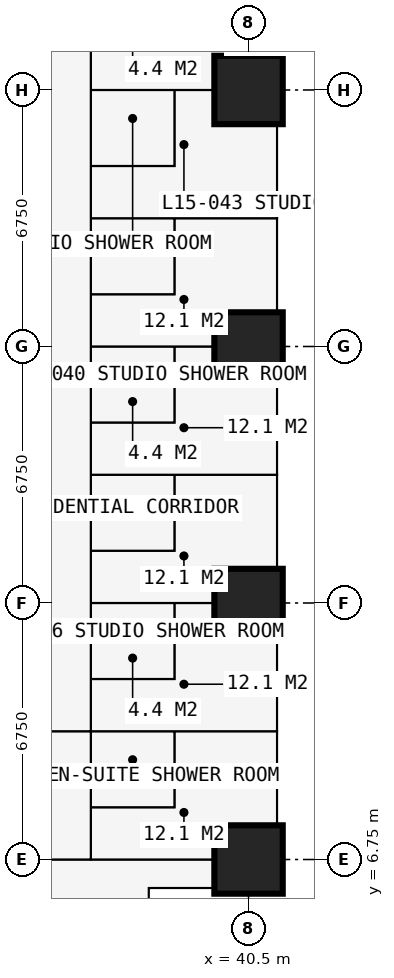
"""IFC4 building model, lengths in metres.
Left out: names, types, materials, properties, quantities, classifications, styles, units other than length and angle.
Written with IfcOpenShell. Run it as: python <this file> out.ifc"""

import sys

from ifc_helpers import new_model, si_unit, direction, frame, frame_2d, origin, origin_2d, place, context, subcontext, project, spatial, rectangle, extrude, element, fill, save


model = new_model("IFC4")
c1 = context("Model", 3, precision=1e-05, world=origin(), true_north=direction((0.0, 1.0)))
c2 = subcontext(c1, "Body", "Model", "MODEL_VIEW")
j1 = project(units=[si_unit("LENGTHUNIT", "METRE"), si_unit("PLANEANGLEUNIT", "RADIAN")], contexts=[c1])
p1 = place(None, origin())
s1 = spatial("IfcSite", under=j1, at=p1, CompositionType="ELEMENT")
p2 = place(p1, origin())
s2 = spatial("IfcBuilding", under=s1, at=p2, CompositionType="ELEMENT")
p3 = place(p2, frame((0.0, 0.0, 57.6)))
s3 = spatial("IfcBuildingStorey", under=s2, at=p3, CompositionType="ELEMENT", Elevation=57.6)
for number, where, z_axis, x_axis in (
    (1, (40.5, 6.75, 0.0), (0.0, 0.0, 1.0), (1.0, 0.0, 0.0)),
    (2, (40.5, 13.5, 0.0), (0.0, 0.0, 1.0), (1.0, 0.0, 0.0)),
    (3, (40.5, 20.25, 0.0), (0.0, 0.0, 1.0), (1.0, 0.0, 0.0)),
    (4, (40.5, 27.0, 0.0), (0.0, 0.0, 1.0), (1.0, 0.0, 0.0)),
):
    element("IfcColumn", number, at=place(p3, frame(where, z_axis=z_axis, x_axis=x_axis)), inside=s3, PredefinedType="COLUMN", context=c2, shape_type="SweptSolid", body=[
        extrude(rectangle(XDim=1.8, YDim=1.8, at=origin_2d()), origin(), (0.0, 0.0, 1.0), 3.6),
    ])
p4 = place(p3, frame((41.25, 27.0, 0.0), z_axis=(0.0, 0.0, 1.0), x_axis=(0.0, -1.0, 0.0)))
e5 = element("IfcWall", 5, at=p4, inside=s3, PredefinedType="SOLIDWALL", context=c2, shape_type="SweptSolid", body=[
    extrude(rectangle(XDim=6.75, YDim=0.15, at=frame_2d((3.375, 0.0))), origin(), (0.0, 0.0, 1.0), 3.375),
])
p5 = place(p4, frame((0.962, 0.0, 0.0)))
e6 = element("IfcOpeningElement", 6, at=p5, cuts=e5, PredefinedType="OPENING", context=c2, shape_type="SweptSolid", body=[
    extrude(rectangle(XDim=1.0, YDim=2.2, at=frame_2d((0.5, 1.1))), frame((0.0, 0.085, 0.0), z_axis=(0.0, -1.0, 0.0), x_axis=(1.0, 0.0, 0.0)), (0.0, 0.0, 1.0), 0.17),
])
p6 = place(p4, frame((2.025, 0.0, 0.9)))
e7 = element("IfcOpeningElement", 7, at=p6, cuts=e5, PredefinedType="OPENING", context=c2, shape_type="SweptSolid", body=[
    extrude(rectangle(XDim=1.2, YDim=1.8, at=frame_2d((0.6, 0.9))), frame((0.0, 0.085, 0.0), z_axis=(0.0, -1.0, 0.0), x_axis=(1.0, 0.0, 0.0)), (0.0, 0.0, 1.0), 0.17),
])
p7 = place(p4, frame((4.788, 0.0, 0.0)))
e8 = element("IfcOpeningElement", 8, at=p7, cuts=e5, PredefinedType="OPENING", context=c2, shape_type="SweptSolid", body=[
    extrude(rectangle(XDim=1.0, YDim=2.2, at=frame_2d((0.5, 1.1))), frame((0.0, 0.085, 0.0), z_axis=(0.0, -1.0, 0.0), x_axis=(1.0, 0.0, 0.0)), (0.0, 0.0, 1.0), 0.17),
])
p8 = place(p4, frame((3.525, 0.0, 0.9)))
e9 = element("IfcOpeningElement", 9, at=p8, cuts=e5, PredefinedType="OPENING", context=c2, shape_type="SweptSolid", body=[
    extrude(rectangle(XDim=1.2, YDim=1.8, at=frame_2d((0.6, 0.9))), frame((0.0, 0.085, 0.0), z_axis=(0.0, -1.0, 0.0), x_axis=(1.0, 0.0, 0.0)), (0.0, 0.0, 1.0), 0.17),
])
p9 = place(p3, frame((37.875, 2.625, 0.0), z_axis=(0.0, 0.0, 1.0), x_axis=(0.0, 1.0, 0.0)))
e10 = element("IfcWall", 10, at=p9, inside=s3, PredefinedType="SOLIDWALL", context=c2, shape_type="SweptSolid", body=[
    extrude(rectangle(XDim=3.375, YDim=0.3, at=frame_2d((1.688, 0.0))), origin(), (0.0, 0.0, 1.0), 3.375),
])
p10 = place(p9, frame((0.788, 0.0, 0.6)))
e11 = element("IfcOpeningElement", 11, at=p10, cuts=e10, PredefinedType="OPENING", context=c2, shape_type="SweptSolid", body=[
    extrude(rectangle(XDim=1.8, YDim=2.1, at=frame_2d((0.9, 1.05))), frame((0.0, 0.16, 0.0), z_axis=(0.0, -1.0, 0.0), x_axis=(1.0, 0.0, 0.0)), (0.0, 0.0, 1.0), 0.32),
])
p11 = place(p3, frame((37.875, 6.0, 0.0), z_axis=(0.0, 0.0, 1.0), x_axis=(1.0, 0.0, 0.0)))
e12 = element("IfcWall", 12, at=p11, inside=s3, PredefinedType="SOLIDWALL", context=c2, shape_type="SweptSolid", body=[
    extrude(rectangle(XDim=3.375, YDim=0.3, at=frame_2d((1.688, 0.0))), origin(), (0.0, 0.0, 1.0), 3.375),
])
p12 = place(p11, frame((0.343, 0.0, 0.9)))
e13 = element("IfcOpeningElement", 13, at=p12, cuts=e12, PredefinedType="OPENING", context=c2, shape_type="SweptSolid", body=[
    extrude(rectangle(XDim=1.2, YDim=1.8, at=frame_2d((0.6, 0.9))), frame((0.0, 0.16, 0.0), z_axis=(0.0, -1.0, 0.0), x_axis=(1.0, 0.0, 0.0)), (0.0, 0.0, 1.0), 0.32),
])
p13 = place(p3, frame((41.35, 23.625, 0.0), z_axis=(0.0, 0.0, 1.0), x_axis=(1.0, 0.0, 0.0)))
e14 = element("IfcWall", 14, at=p13, inside=s3, PredefinedType="USERDEFINED", context=c2, shape_type="SweptSolid", body=[
    extrude(rectangle(XDim=2.2, YDim=1.0, at=frame_2d((1.1, 0.0))), origin(), (0.0, 0.0, 1.0), 0.9),
])
p14 = place(p3, frame((30.375, 6.75, 0.0), z_axis=(0.0, 0.0, 1.0), x_axis=(1.0, 0.0, 0.0)))
e15 = element("IfcWall", 15, at=p14, inside=s3, PredefinedType="PARTITIONING", context=c2, shape_type="SweptSolid", body=[
    extrude(rectangle(XDim=10.859, YDim=0.15, at=frame_2d((5.429, 0.0))), origin(), (0.0, 0.0, 1.0), 2.877),
])
p15 = place(p14, frame((1.45, 0.0, 0.0)))
e16 = element("IfcOpeningElement", 16, at=p15, cuts=e15, PredefinedType="OPENING", context=c2, shape_type="SweptSolid", body=[
    extrude(rectangle(XDim=1.0, YDim=2.2, at=frame_2d((0.5, 1.1))), frame((0.0, 0.085, 0.0), z_axis=(0.0, -1.0, 0.0), x_axis=(1.0, 0.0, 0.0)), (0.0, 0.0, 1.0), 0.17),
])
p16 = place(p3, frame((30.375, 10.125, 0.0), z_axis=(0.0, 0.0, 1.0), x_axis=(1.0, 0.0, 0.0)))
e17 = element("IfcWall", 17, at=p16, inside=s3, PredefinedType="PARTITIONING", context=c2, shape_type="SweptSolid", body=[
    extrude(rectangle(XDim=10.859, YDim=0.15, at=frame_2d((5.429, 0.0))), origin(), (0.0, 0.0, 1.0), 3.375),
])
p17 = place(p16, frame((2.5, 0.0, 0.0)))
e18 = element("IfcOpeningElement", 18, at=p17, cuts=e17, PredefinedType="OPENING", context=c2, shape_type="SweptSolid", body=[
    extrude(rectangle(XDim=1.0, YDim=2.2, at=frame_2d((0.5, 1.1))), frame((0.0, 0.085, 0.0), z_axis=(0.0, -1.0, 0.0), x_axis=(1.0, 0.0, 0.0)), (0.0, 0.0, 1.0), 0.17),
])
p18 = place(p3, frame((36.35, 6.75, 0.0), z_axis=(0.0, 0.0, 1.0), x_axis=(0.0, 1.0, 0.0)))
e19 = element("IfcWall", 19, at=p18, inside=s3, PredefinedType="PARTITIONING", context=c2, shape_type="SweptSolid", body=[
    extrude(rectangle(XDim=23.625, YDim=0.1, at=frame_2d((11.812, 0.0))), origin(), (0.0, 0.0, 1.0), 3.375),
])
p19 = place(p18, frame((0.2, 0.0, 0.0)))
e20 = element("IfcOpeningElement", 20, at=p19, cuts=e19, PredefinedType="OPENING", context=c2, shape_type="SweptSolid", body=[
    extrude(rectangle(XDim=0.95, YDim=2.2, at=frame_2d((0.475, 1.1))), frame((0.0, 0.06, 0.0), z_axis=(0.0, -1.0, 0.0), x_axis=(1.0, 0.0, 0.0)), (0.0, 0.0, 1.0), 0.12),
])
p20 = place(p18, frame((3.575, 0.0, 0.0)))
e21 = element("IfcOpeningElement", 21, at=p20, cuts=e19, PredefinedType="OPENING", context=c2, shape_type="SweptSolid", body=[
    extrude(rectangle(XDim=0.95, YDim=2.2, at=frame_2d((0.475, 1.1))), frame((0.0, 0.06, 0.0), z_axis=(0.0, -1.0, 0.0), x_axis=(1.0, 0.0, 0.0)), (0.0, 0.0, 1.0), 0.12),
])
p21 = place(p18, frame((7.0, 0.0, 0.0)))
e22 = element("IfcOpeningElement", 22, at=p21, cuts=e19, PredefinedType="OPENING", context=c2, shape_type="SweptSolid", body=[
    extrude(rectangle(XDim=0.95, YDim=2.2, at=frame_2d((0.475, 1.1))), frame((0.0, 0.06, 0.0), z_axis=(0.0, -1.0, 0.0), x_axis=(1.0, 0.0, 0.0)), (0.0, 0.0, 1.0), 0.12),
])
p22 = place(p18, frame((10.375, 0.0, 0.0)))
e23 = element("IfcOpeningElement", 23, at=p22, cuts=e19, PredefinedType="OPENING", context=c2, shape_type="SweptSolid", body=[
    extrude(rectangle(XDim=0.95, YDim=2.2, at=frame_2d((0.475, 1.1))), frame((0.0, 0.06, 0.0), z_axis=(0.0, -1.0, 0.0), x_axis=(1.0, 0.0, 0.0)), (0.0, 0.0, 1.0), 0.12),
])
p23 = place(p18, frame((13.75, 0.0, 0.0)))
e24 = element("IfcOpeningElement", 24, at=p23, cuts=e19, PredefinedType="OPENING", context=c2, shape_type="SweptSolid", body=[
    extrude(rectangle(XDim=0.95, YDim=2.2, at=frame_2d((0.475, 1.1))), frame((0.0, 0.06, 0.0), z_axis=(0.0, -1.0, 0.0), x_axis=(1.0, 0.0, 0.0)), (0.0, 0.0, 1.0), 0.12),
])
p24 = place(p18, frame((17.125, 0.0, 0.0)))
e25 = element("IfcOpeningElement", 25, at=p24, cuts=e19, PredefinedType="OPENING", context=c2, shape_type="SweptSolid", body=[
    extrude(rectangle(XDim=0.95, YDim=2.2, at=frame_2d((0.475, 1.1))), frame((0.0, 0.06, 0.0), z_axis=(0.0, -1.0, 0.0), x_axis=(1.0, 0.0, 0.0)), (0.0, 0.0, 1.0), 0.12),
])
p25 = place(p18, frame((20.5, 0.0, 0.0)))
e26 = element("IfcOpeningElement", 26, at=p25, cuts=e19, PredefinedType="OPENING", context=c2, shape_type="SweptSolid", body=[
    extrude(rectangle(XDim=0.95, YDim=2.2, at=frame_2d((0.475, 1.1))), frame((0.0, 0.06, 0.0), z_axis=(0.0, -1.0, 0.0), x_axis=(1.0, 0.0, 0.0)), (0.0, 0.0, 1.0), 0.12),
])
p26 = place(p3, frame((36.35, 8.125, 0.0), z_axis=(0.0, 0.0, 1.0), x_axis=(1.0, 0.0, 0.0)))
e27 = element("IfcWall", 27, at=p26, inside=s3, PredefinedType="PARTITIONING", context=c2, shape_type="SweptSolid", body=[
    extrude(rectangle(XDim=2.2, YDim=0.1, at=frame_2d((1.1, 0.0))), origin(), (0.0, 0.0, 1.0), 3.375),
])
p27 = place(p26, frame((0.65, 0.0, 0.0)))
e28 = element("IfcOpeningElement", 28, at=p27, cuts=e27, PredefinedType="OPENING", context=c2, shape_type="SweptSolid", body=[
    extrude(rectangle(XDim=0.9, YDim=2.2, at=frame_2d((0.45, 1.1))), frame((0.0, 0.06, 0.0), z_axis=(0.0, -1.0, 0.0), x_axis=(1.0, 0.0, 0.0)), (0.0, 0.0, 1.0), 0.12),
])
p28 = place(p3, frame((36.35, 11.5, 0.0), z_axis=(0.0, 0.0, 1.0), x_axis=(1.0, 0.0, 0.0)))
e29 = element("IfcWall", 29, at=p28, inside=s3, PredefinedType="PARTITIONING", context=c2, shape_type="SweptSolid", body=[
    extrude(rectangle(XDim=2.2, YDim=0.1, at=frame_2d((1.1, 0.0))), origin(), (0.0, 0.0, 1.0), 3.375),
])
p29 = place(p28, frame((0.65, 0.0, 0.0)))
e30 = element("IfcOpeningElement", 30, at=p29, cuts=e29, PredefinedType="OPENING", context=c2, shape_type="SweptSolid", body=[
    extrude(rectangle(XDim=0.9, YDim=2.2, at=frame_2d((0.45, 1.1))), frame((0.0, 0.06, 0.0), z_axis=(0.0, -1.0, 0.0), x_axis=(1.0, 0.0, 0.0)), (0.0, 0.0, 1.0), 0.12),
])
p30 = place(p3, frame((36.35, 13.5, 0.0), z_axis=(0.0, 0.0, 1.0), x_axis=(1.0, 0.0, 0.0)))
e31 = element("IfcWall", 31, at=p30, inside=s3, PredefinedType="PARTITIONING", context=c2, shape_type="SweptSolid", body=[
    extrude(rectangle(XDim=4.884, YDim=0.175, at=frame_2d((2.442, 0.0))), origin(), (0.0, 0.0, 1.0), 2.61),
])
p31 = place(p3, frame((36.35, 14.875, 0.0), z_axis=(0.0, 0.0, 1.0), x_axis=(1.0, 0.0, 0.0)))
e32 = element("IfcWall", 32, at=p31, inside=s3, PredefinedType="PARTITIONING", context=c2, shape_type="SweptSolid", body=[
    extrude(rectangle(XDim=2.2, YDim=0.1, at=frame_2d((1.1, 0.0))), origin(), (0.0, 0.0, 1.0), 3.375),
])
p32 = place(p31, frame((0.65, 0.0, 0.0)))
e33 = element("IfcOpeningElement", 33, at=p32, cuts=e32, PredefinedType="OPENING", context=c2, shape_type="SweptSolid", body=[
    extrude(rectangle(XDim=0.9, YDim=2.2, at=frame_2d((0.45, 1.1))), frame((0.0, 0.06, 0.0), z_axis=(0.0, -1.0, 0.0), x_axis=(1.0, 0.0, 0.0)), (0.0, 0.0, 1.0), 0.12),
])
p33 = place(p3, frame((36.35, 16.875, 0.0), z_axis=(0.0, 0.0, 1.0), x_axis=(1.0, 0.0, 0.0)))
e34 = element("IfcWall", 34, at=p33, inside=s3, PredefinedType="PARTITIONING", context=c2, shape_type="SweptSolid", body=[
    extrude(rectangle(XDim=4.884, YDim=0.175, at=frame_2d((2.442, 0.0))), origin(), (0.0, 0.0, 1.0), 3.375),
])
p34 = place(p3, frame((36.35, 18.25, 0.0), z_axis=(0.0, 0.0, 1.0), x_axis=(1.0, 0.0, 0.0)))
e35 = element("IfcWall", 35, at=p34, inside=s3, PredefinedType="PARTITIONING", context=c2, shape_type="SweptSolid", body=[
    extrude(rectangle(XDim=2.2, YDim=0.1, at=frame_2d((1.1, 0.0))), origin(), (0.0, 0.0, 1.0), 3.375),
])
p35 = place(p34, frame((0.65, 0.0, 0.0)))
e36 = element("IfcOpeningElement", 36, at=p35, cuts=e35, PredefinedType="OPENING", context=c2, shape_type="SweptSolid", body=[
    extrude(rectangle(XDim=0.9, YDim=2.2, at=frame_2d((0.45, 1.1))), frame((0.0, 0.06, 0.0), z_axis=(0.0, -1.0, 0.0), x_axis=(1.0, 0.0, 0.0)), (0.0, 0.0, 1.0), 0.12),
])
p36 = place(p3, frame((36.35, 20.25, 0.0), z_axis=(0.0, 0.0, 1.0), x_axis=(1.0, 0.0, 0.0)))
e37 = element("IfcWall", 37, at=p36, inside=s3, PredefinedType="PARTITIONING", context=c2, shape_type="SweptSolid", body=[
    extrude(rectangle(XDim=4.884, YDim=0.175, at=frame_2d((2.442, 0.0))), origin(), (0.0, 0.0, 1.0), 2.61),
])
p37 = place(p3, frame((36.35, 21.625, 0.0), z_axis=(0.0, 0.0, 1.0), x_axis=(1.0, 0.0, 0.0)))
e38 = element("IfcWall", 38, at=p37, inside=s3, PredefinedType="PARTITIONING", context=c2, shape_type="SweptSolid", body=[
    extrude(rectangle(XDim=2.2, YDim=0.1, at=frame_2d((1.1, 0.0))), origin(), (0.0, 0.0, 1.0), 3.375),
])
p38 = place(p37, frame((0.65, 0.0, 0.0)))
e39 = element("IfcOpeningElement", 39, at=p38, cuts=e38, PredefinedType="OPENING", context=c2, shape_type="SweptSolid", body=[
    extrude(rectangle(XDim=0.9, YDim=2.2, at=frame_2d((0.45, 1.1))), frame((0.0, 0.06, 0.0), z_axis=(0.0, -1.0, 0.0), x_axis=(1.0, 0.0, 0.0)), (0.0, 0.0, 1.0), 0.12),
])
p39 = place(p3, frame((36.35, 23.625, 0.0), z_axis=(0.0, 0.0, 1.0), x_axis=(1.0, 0.0, 0.0)))
e40 = element("IfcWall", 40, at=p39, inside=s3, PredefinedType="PARTITIONING", context=c2, shape_type="SweptSolid", body=[
    extrude(rectangle(XDim=4.884, YDim=0.175, at=frame_2d((2.442, 0.0))), origin(), (0.0, 0.0, 1.0), 3.375),
])
p40 = place(p3, frame((36.35, 25.0, 0.0), z_axis=(0.0, 0.0, 1.0), x_axis=(1.0, 0.0, 0.0)))
e41 = element("IfcWall", 41, at=p40, inside=s3, PredefinedType="PARTITIONING", context=c2, shape_type="SweptSolid", body=[
    extrude(rectangle(XDim=2.2, YDim=0.1, at=frame_2d((1.1, 0.0))), origin(), (0.0, 0.0, 1.0), 3.375),
])
p41 = place(p40, frame((0.65, 0.0, 0.0)))
e42 = element("IfcOpeningElement", 42, at=p41, cuts=e41, PredefinedType="OPENING", context=c2, shape_type="SweptSolid", body=[
    extrude(rectangle(XDim=0.9, YDim=2.2, at=frame_2d((0.45, 1.1))), frame((0.0, 0.06, 0.0), z_axis=(0.0, -1.0, 0.0), x_axis=(1.0, 0.0, 0.0)), (0.0, 0.0, 1.0), 0.12),
])
p42 = place(p3, frame((36.35, 27.0, 0.0), z_axis=(0.0, 0.0, 1.0), x_axis=(1.0, 0.0, 0.0)))
e43 = element("IfcWall", 43, at=p42, inside=s3, PredefinedType="PARTITIONING", context=c2, shape_type="SweptSolid", body=[
    extrude(rectangle(XDim=4.884, YDim=0.175, at=frame_2d((2.442, 0.0))), origin(), (0.0, 0.0, 1.0), 2.877),
])
for number, where, z_axis, x_axis in (
    (44, (38.55, 8.125, 0.0), (0.0, 0.0, 1.0), (0.0, 1.0, 0.0)),
    (45, (38.55, 11.5, 0.0), (0.0, 0.0, 1.0), (0.0, 1.0, 0.0)),
    (46, (38.55, 14.875, 0.0), (0.0, 0.0, 1.0), (0.0, 1.0, 0.0)),
    (47, (38.55, 18.25, 0.0), (0.0, 0.0, 1.0), (0.0, 1.0, 0.0)),
    (48, (38.55, 21.625, 0.0), (0.0, 0.0, 1.0), (0.0, 1.0, 0.0)),
    (49, (38.55, 25.0, 0.0), (0.0, 0.0, 1.0), (0.0, 1.0, 0.0)),
):
    element("IfcWall", number, at=place(p3, frame(where, z_axis=z_axis, x_axis=x_axis)), inside=s3, PredefinedType="PARTITIONING", context=c2, shape_type="SweptSolid", body=[
        extrude(rectangle(XDim=2.0, YDim=0.1, at=frame_2d((1.0, 0.0))), origin(), (0.0, 0.0, 1.0), 3.375),
    ])
p43 = place(p5, origin())
e50 = element("IfcDoor", 50, at=p43, inside=s3, OperationType="SINGLE_SWING_LEFT", PredefinedType="DOOR", context=c2, shape_type="SweptSolid", body=[
    extrude(rectangle(XDim=1.0, YDim=2.2, at=frame_2d((0.5, 1.1))), frame((0.0, 0.025, 0.0), z_axis=(0.0, -1.0, 0.0), x_axis=(1.0, 0.0, 0.0)), (0.0, 0.0, 1.0), 0.05),
])
fill(e6, e50)
p44 = place(p6, origin())
e51 = element("IfcWindow", 51, at=p44, inside=s3, PartitioningType="SINGLE_PANEL", PredefinedType="WINDOW", context=c2, shape_type="SweptSolid", body=[
    extrude(rectangle(XDim=1.2, YDim=1.8, at=frame_2d((0.6, 0.9))), frame((0.0, 0.03, 0.0), z_axis=(0.0, -1.0, 0.0), x_axis=(1.0, 0.0, 0.0)), (0.0, 0.0, 1.0), 0.06),
])
fill(e7, e51)
p45 = place(p7, origin())
e52 = element("IfcDoor", 52, at=p45, inside=s3, OperationType="SINGLE_SWING_RIGHT", PredefinedType="DOOR", context=c2, shape_type="SweptSolid", body=[
    extrude(rectangle(XDim=1.0, YDim=2.2, at=frame_2d((0.5, 1.1))), frame((0.0, 0.025, 0.0), z_axis=(0.0, -1.0, 0.0), x_axis=(1.0, 0.0, 0.0)), (0.0, 0.0, 1.0), 0.05),
])
fill(e8, e52)
p46 = place(p8, origin())
e53 = element("IfcWindow", 53, at=p46, inside=s3, PartitioningType="SINGLE_PANEL", PredefinedType="WINDOW", context=c2, shape_type="SweptSolid", body=[
    extrude(rectangle(XDim=1.2, YDim=1.8, at=frame_2d((0.6, 0.9))), frame((0.0, 0.03, 0.0), z_axis=(0.0, -1.0, 0.0), x_axis=(1.0, 0.0, 0.0)), (0.0, 0.0, 1.0), 0.06),
])
fill(e9, e53)
p47 = place(p12, origin())
e54 = element("IfcWindow", 54, at=p47, inside=s3, PartitioningType="SINGLE_PANEL", PredefinedType="WINDOW", context=c2, shape_type="SweptSolid", body=[
    extrude(rectangle(XDim=1.2, YDim=1.8, at=frame_2d((0.6, 0.9))), frame((0.0, 0.03, 0.0), z_axis=(0.0, -1.0, 0.0), x_axis=(1.0, 0.0, 0.0)), (0.0, 0.0, 1.0), 0.06),
])
fill(e13, e54)
p48 = place(p19, origin())
e55 = element("IfcDoor", 55, at=p48, inside=s3, OperationType="SINGLE_SWING_LEFT", PredefinedType="DOOR", context=c2, shape_type="SweptSolid", body=[
    extrude(rectangle(XDim=0.95, YDim=2.2, at=frame_2d((0.475, 1.1))), frame((0.0, 0.025, 0.0), z_axis=(0.0, -1.0, 0.0), x_axis=(1.0, 0.0, 0.0)), (0.0, 0.0, 1.0), 0.05),
])
fill(e20, e55)
p49 = place(p27, origin())
e56 = element("IfcDoor", 56, at=p49, inside=s3, OperationType="SINGLE_SWING_RIGHT", PredefinedType="DOOR", context=c2, shape_type="SweptSolid", body=[
    extrude(rectangle(XDim=0.9, YDim=2.2, at=frame_2d((0.45, 1.1))), frame((0.0, 0.025, 0.0), z_axis=(0.0, -1.0, 0.0), x_axis=(1.0, 0.0, 0.0)), (0.0, 0.0, 1.0), 0.05),
])
fill(e28, e56)
p50 = place(p20, origin())
e57 = element("IfcDoor", 57, at=p50, inside=s3, OperationType="SINGLE_SWING_LEFT", PredefinedType="DOOR", context=c2, shape_type="SweptSolid", body=[
    extrude(rectangle(XDim=0.95, YDim=2.2, at=frame_2d((0.475, 1.1))), frame((0.0, 0.025, 0.0), z_axis=(0.0, -1.0, 0.0), x_axis=(1.0, 0.0, 0.0)), (0.0, 0.0, 1.0), 0.05),
])
fill(e21, e57)
p51 = place(p29, origin())
e58 = element("IfcDoor", 58, at=p51, inside=s3, OperationType="SINGLE_SWING_RIGHT", PredefinedType="DOOR", context=c2, shape_type="SweptSolid", body=[
    extrude(rectangle(XDim=0.9, YDim=2.2, at=frame_2d((0.45, 1.1))), frame((0.0, 0.025, 0.0), z_axis=(0.0, -1.0, 0.0), x_axis=(1.0, 0.0, 0.0)), (0.0, 0.0, 1.0), 0.05),
])
fill(e30, e58)
p52 = place(p21, origin())
e59 = element("IfcDoor", 59, at=p52, inside=s3, OperationType="SINGLE_SWING_LEFT", PredefinedType="DOOR", context=c2, shape_type="SweptSolid", body=[
    extrude(rectangle(XDim=0.95, YDim=2.2, at=frame_2d((0.475, 1.1))), frame((0.0, 0.025, 0.0), z_axis=(0.0, -1.0, 0.0), x_axis=(1.0, 0.0, 0.0)), (0.0, 0.0, 1.0), 0.05),
])
fill(e22, e59)
p53 = place(p32, origin())
e60 = element("IfcDoor", 60, at=p53, inside=s3, OperationType="SINGLE_SWING_RIGHT", PredefinedType="DOOR", context=c2, shape_type="SweptSolid", body=[
    extrude(rectangle(XDim=0.9, YDim=2.2, at=frame_2d((0.45, 1.1))), frame((0.0, 0.025, 0.0), z_axis=(0.0, -1.0, 0.0), x_axis=(1.0, 0.0, 0.0)), (0.0, 0.0, 1.0), 0.05),
])
fill(e33, e60)
p54 = place(p22, origin())
e61 = element("IfcDoor", 61, at=p54, inside=s3, OperationType="SINGLE_SWING_LEFT", PredefinedType="DOOR", context=c2, shape_type="SweptSolid", body=[
    extrude(rectangle(XDim=0.95, YDim=2.2, at=frame_2d((0.475, 1.1))), frame((0.0, 0.025, 0.0), z_axis=(0.0, -1.0, 0.0), x_axis=(1.0, 0.0, 0.0)), (0.0, 0.0, 1.0), 0.05),
])
fill(e23, e61)
p55 = place(p35, origin())
e62 = element("IfcDoor", 62, at=p55, inside=s3, OperationType="SINGLE_SWING_RIGHT", PredefinedType="DOOR", context=c2, shape_type="SweptSolid", body=[
    extrude(rectangle(XDim=0.9, YDim=2.2, at=frame_2d((0.45, 1.1))), frame((0.0, 0.025, 0.0), z_axis=(0.0, -1.0, 0.0), x_axis=(1.0, 0.0, 0.0)), (0.0, 0.0, 1.0), 0.05),
])
fill(e36, e62)
p56 = place(p23, origin())
e63 = element("IfcDoor", 63, at=p56, inside=s3, OperationType="SINGLE_SWING_LEFT", PredefinedType="DOOR", context=c2, shape_type="SweptSolid", body=[
    extrude(rectangle(XDim=0.95, YDim=2.2, at=frame_2d((0.475, 1.1))), frame((0.0, 0.025, 0.0), z_axis=(0.0, -1.0, 0.0), x_axis=(1.0, 0.0, 0.0)), (0.0, 0.0, 1.0), 0.05),
])
fill(e24, e63)
p57 = place(p38, origin())
e64 = element("IfcDoor", 64, at=p57, inside=s3, OperationType="SINGLE_SWING_RIGHT", PredefinedType="DOOR", context=c2, shape_type="SweptSolid", body=[
    extrude(rectangle(XDim=0.9, YDim=2.2, at=frame_2d((0.45, 1.1))), frame((0.0, 0.025, 0.0), z_axis=(0.0, -1.0, 0.0), x_axis=(1.0, 0.0, 0.0)), (0.0, 0.0, 1.0), 0.05),
])
fill(e39, e64)
p58 = place(p24, origin())
e65 = element("IfcDoor", 65, at=p58, inside=s3, OperationType="SINGLE_SWING_LEFT", PredefinedType="DOOR", context=c2, shape_type="SweptSolid", body=[
    extrude(rectangle(XDim=0.95, YDim=2.2, at=frame_2d((0.475, 1.1))), frame((0.0, 0.025, 0.0), z_axis=(0.0, -1.0, 0.0), x_axis=(1.0, 0.0, 0.0)), (0.0, 0.0, 1.0), 0.05),
])
fill(e25, e65)
p59 = place(p41, origin())
e66 = element("IfcDoor", 66, at=p59, inside=s3, OperationType="SINGLE_SWING_RIGHT", PredefinedType="DOOR", context=c2, shape_type="SweptSolid", body=[
    extrude(rectangle(XDim=0.9, YDim=2.2, at=frame_2d((0.45, 1.1))), frame((0.0, 0.025, 0.0), z_axis=(0.0, -1.0, 0.0), x_axis=(1.0, 0.0, 0.0)), (0.0, 0.0, 1.0), 0.05),
])
fill(e42, e66)
p60 = place(p25, origin())
e67 = element("IfcDoor", 67, at=p60, inside=s3, OperationType="SINGLE_SWING_LEFT", PredefinedType="DOOR", context=c2, shape_type="SweptSolid", body=[
    extrude(rectangle(XDim=0.95, YDim=2.2, at=frame_2d((0.475, 1.1))), frame((0.0, 0.025, 0.0), z_axis=(0.0, -1.0, 0.0), x_axis=(1.0, 0.0, 0.0)), (0.0, 0.0, 1.0), 0.05),
])
fill(e26, e67)
save(model, sys.argv[1])
